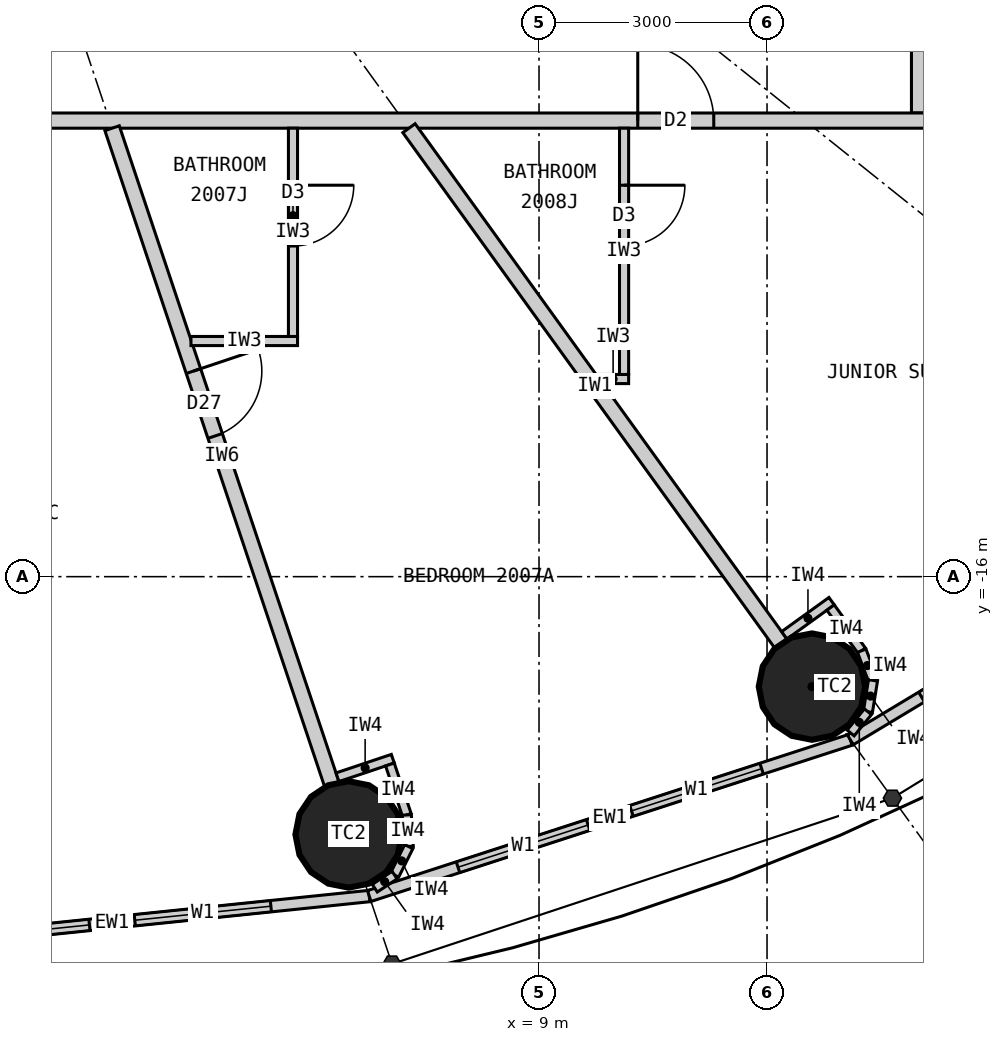
"""IFC4 building model, lengths in metres.
Left out: names, types, materials, properties, quantities, classifications, styles, units other than length and angle.
Written with IfcOpenShell. Run it as: python <this file> out.ifc"""

import sys

from ifc_helpers import new_model, si_unit, direction, frame, frame_2d, origin, origin_2d, place, context, subcontext, project, spatial, rectangle, circle, extrude, element, fill, save


model = new_model("IFC4")
c1 = context("Model", 3, precision=1e-05, world=origin(), true_north=direction((0.0, 1.0)))
c2 = subcontext(c1, "Body", "Model", "MODEL_VIEW")
j1 = project(units=[si_unit("LENGTHUNIT", "METRE"), si_unit("PLANEANGLEUNIT", "RADIAN")], contexts=[c1])
p1 = place(None, origin())
s1 = spatial("IfcSite", under=j1, at=p1, CompositionType="ELEMENT")
p2 = place(p1, origin())
s2 = spatial("IfcBuilding", under=s1, at=p2, CompositionType="ELEMENT")
p3 = place(p2, frame((0.0, 0.0, 80.4)))
s3 = spatial("IfcBuildingStorey", under=s2, at=p3, CompositionType="ELEMENT", Elevation=80.4)
for number, where, z_axis, x_axis in (
    (1, (6.495, -19.391, 0.0), (0.0, 0.0, 1.0), (1.0, 0.0, 0.0)),
    (2, (12.591, -17.447, 0.0), (0.0, 0.0, 1.0), (1.0, 0.0, 0.0)),
):
    element("IfcColumn", number, at=place(p3, frame(where, z_axis=z_axis, x_axis=x_axis)), inside=s3, PredefinedType="COLUMN", context=c2, shape_type="SweptSolid", body=[
        extrude(circle(Radius=0.7, at=origin_2d()), origin(), (0.0, 0.0, 1.0), 3.3),
    ])
p4 = place(p3, frame((0.0, -20.9, 0.0), z_axis=(0.0, 0.0, 1.0), x_axis=(0.994721394369, 0.102612609291, 0.0)))
e3 = element("IfcWall", 3, at=p4, inside=s3, PredefinedType="ELEMENTEDWALL", context=c2, shape_type="SweptSolid", body=[
    extrude(rectangle(XDim=6.802, YDim=0.15, at=frame_2d((3.401, 0.0))), origin(), (0.0, 0.0, 1.0), 3.12),
])
p5 = place(p4, frame((1.301, 0.0, 0.9)))
e4 = element("IfcOpeningElement", 4, at=p5, cuts=e3, PredefinedType="OPENING", context=c2, shape_type="SweptSolid", body=[
    extrude(rectangle(XDim=1.8, YDim=1.9, at=frame_2d((0.9, 0.95))), frame((0.0, 0.085, 0.0), z_axis=(0.0, -1.0, 0.0), x_axis=(1.0, 0.0, 0.0)), (0.0, 0.0, 1.0), 0.17),
])
p6 = place(p4, frame((3.701, 0.0, 0.9)))
e5 = element("IfcOpeningElement", 5, at=p6, cuts=e3, PredefinedType="OPENING", context=c2, shape_type="SweptSolid", body=[
    extrude(rectangle(XDim=1.8, YDim=1.9, at=frame_2d((0.9, 0.95))), frame((0.0, 0.085, 0.0), z_axis=(0.0, -1.0, 0.0), x_axis=(1.0, 0.0, 0.0)), (0.0, 0.0, 1.0), 0.17),
])
p7 = place(p3, frame((6.766, -20.202, 0.0), z_axis=(0.0, 0.0, 1.0), x_axis=(0.951137534625, 0.308767534285, 0.0)))
e6 = element("IfcWall", 6, at=p7, inside=s3, PredefinedType="ELEMENTEDWALL", context=c2, shape_type="SweptSolid", body=[
    extrude(rectangle(XDim=6.655, YDim=0.15, at=frame_2d((3.328, 0.0))), origin(), (0.0, 0.0, 1.0), 3.12),
])
p8 = place(p7, frame((1.228, 0.0, 0.9)))
e7 = element("IfcOpeningElement", 7, at=p8, cuts=e6, PredefinedType="OPENING", context=c2, shape_type="SweptSolid", body=[
    extrude(rectangle(XDim=1.8, YDim=1.9, at=frame_2d((0.9, 0.95))), frame((0.0, 0.085, 0.0), z_axis=(0.0, -1.0, 0.0), x_axis=(1.0, 0.0, 0.0)), (0.0, 0.0, 1.0), 0.17),
])
p9 = place(p7, frame((3.628, 0.0, 0.9)))
e8 = element("IfcOpeningElement", 8, at=p9, cuts=e6, PredefinedType="OPENING", context=c2, shape_type="SweptSolid", body=[
    extrude(rectangle(XDim=1.8, YDim=1.9, at=frame_2d((0.9, 0.95))), frame((0.0, 0.085, 0.0), z_axis=(0.0, -1.0, 0.0), x_axis=(1.0, 0.0, 0.0)), (0.0, 0.0, 1.0), 0.17),
])
p10 = place(p3, frame((13.096, -18.147, 0.0), z_axis=(0.0, 0.0, 1.0), x_axis=(0.856983180864, 0.515344377787, 0.0)))
e9 = element("IfcWall", 9, at=p10, inside=s3, PredefinedType="ELEMENTEDWALL", context=c2, shape_type="SweptSolid", body=[
    extrude(rectangle(XDim=6.386, YDim=0.15, at=frame_2d((3.193, 0.0))), origin(), (0.0, 0.0, 1.0), 3.12),
])
p11 = place(p10, frame((1.093, 0.0, 0.9)))
e10 = element("IfcOpeningElement", 10, at=p11, cuts=e9, PredefinedType="OPENING", context=c2, shape_type="SweptSolid", body=[
    extrude(rectangle(XDim=1.8, YDim=1.9, at=frame_2d((0.9, 0.95))), frame((0.0, 0.085, 0.0), z_axis=(0.0, -1.0, 0.0), x_axis=(1.0, 0.0, 0.0)), (0.0, 0.0, 1.0), 0.17),
])
p12 = place(p10, frame((3.493, 0.0, 0.9)))
e11 = element("IfcOpeningElement", 11, at=p12, cuts=e9, PredefinedType="OPENING", context=c2, shape_type="SweptSolid", body=[
    extrude(rectangle(XDim=1.8, YDim=1.9, at=frame_2d((0.9, 0.95))), frame((0.0, 0.085, 0.0), z_axis=(0.0, -1.0, 0.0), x_axis=(1.0, 0.0, 0.0)), (0.0, 0.0, 1.0), 0.17),
])
p13 = place(p3, frame((14.0, -9.9, 0.0), z_axis=(0.0, 0.0, 1.0), x_axis=(0.0, 1.0, 0.0)))
e12 = element("IfcWall", 12, at=p13, inside=s3, PredefinedType="PARTITIONING", context=c2, shape_type="SweptSolid", body=[
    extrude(rectangle(XDim=19.8, YDim=0.2, at=frame_2d((9.9, 0.0))), origin(), (0.0, 0.0, 1.0), 3.12),
])
p14 = place(p13, frame((5.948, 0.0, 0.0)))
e13 = element("IfcOpeningElement", 13, at=p14, cuts=e12, PredefinedType="OPENING", context=c2, shape_type="SweptSolid", body=[
    extrude(rectangle(XDim=1.0, YDim=2.2, at=frame_2d((0.5, 1.1))), frame((0.0, 0.11, 0.0), z_axis=(0.0, -1.0, 0.0), x_axis=(1.0, 0.0, 0.0)), (0.0, 0.0, 1.0), 0.22),
])
p15 = place(p13, frame((11.46, 0.0, 0.0)))
e14 = element("IfcOpeningElement", 14, at=p15, cuts=e12, PredefinedType="OPENING", context=c2, shape_type="SweptSolid", body=[
    extrude(rectangle(XDim=1.0, YDim=2.2, at=frame_2d((0.5, 1.1))), frame((0.0, 0.11, 0.0), z_axis=(0.0, -1.0, 0.0), x_axis=(1.0, 0.0, 0.0)), (0.0, 0.0, 1.0), 0.22),
])
p16 = place(p3, frame((14.1, -10.0, 0.0), z_axis=(0.0, 0.0, 1.0), x_axis=(-1.0, 0.0, 0.0)))
e15 = element("IfcWall", 15, at=p16, inside=s3, PredefinedType="PARTITIONING", context=c2, shape_type="SweptSolid", body=[
    extrude(rectangle(XDim=28.2, YDim=0.2, at=frame_2d((14.1, 0.0))), origin(), (0.0, 0.0, 1.0), 3.12),
])
p17 = place(p16, frame((23.865, 0.0, 0.0)))
e16 = element("IfcOpeningElement", 16, at=p17, cuts=e15, PredefinedType="OPENING", context=c2, shape_type="SweptSolid", body=[
    extrude(rectangle(XDim=1.0, YDim=2.2, at=frame_2d((0.5, 1.1))), frame((0.0, 0.11, 0.0), z_axis=(0.0, -1.0, 0.0), x_axis=(1.0, 0.0, 0.0)), (0.0, 0.0, 1.0), 0.22),
])
p18 = place(p16, frame((18.529, 0.0, 0.0)))
e17 = element("IfcOpeningElement", 17, at=p18, cuts=e15, PredefinedType="OPENING", context=c2, shape_type="SweptSolid", body=[
    extrude(rectangle(XDim=1.0, YDim=2.2, at=frame_2d((0.5, 1.1))), frame((0.0, 0.11, 0.0), z_axis=(0.0, -1.0, 0.0), x_axis=(1.0, 0.0, 0.0)), (0.0, 0.0, 1.0), 0.22),
])
p19 = place(p16, frame((14.923, 0.0, 0.0)))
e18 = element("IfcOpeningElement", 18, at=p19, cuts=e15, PredefinedType="OPENING", context=c2, shape_type="SweptSolid", body=[
    extrude(rectangle(XDim=1.0, YDim=2.2, at=frame_2d((0.5, 1.1))), frame((0.0, 0.11, 0.0), z_axis=(0.0, -1.0, 0.0), x_axis=(1.0, 0.0, 0.0)), (0.0, 0.0, 1.0), 0.22),
])
p20 = place(p16, frame((2.801, 0.0, 0.0)))
e19 = element("IfcOpeningElement", 19, at=p20, cuts=e15, PredefinedType="OPENING", context=c2, shape_type="SweptSolid", body=[
    extrude(rectangle(XDim=1.0, YDim=2.2, at=frame_2d((0.5, 1.1))), frame((0.0, 0.11, 0.0), z_axis=(0.0, -1.0, 0.0), x_axis=(1.0, 0.0, 0.0)), (0.0, 0.0, 1.0), 0.22),
])
p21 = place(p3, frame((3.383, -10.1, 0.0), z_axis=(0.0, 0.0, 1.0), x_axis=(0.31759592231, -0.948226149256, 0.0)))
e20 = element("IfcWall", 20, at=p21, inside=s3, PredefinedType="PARTITIONING", context=c2, shape_type="SweptSolid", body=[
    extrude(rectangle(XDim=9.098, YDim=0.2, at=frame_2d((4.549, 0.0))), origin(), (0.0, 0.0, 1.0), 2.32),
])
p22 = place(p21, frame((3.37, 0.0, 0.0)))
e21 = element("IfcOpeningElement", 21, at=p22, cuts=e20, PredefinedType="OPENING", context=c2, shape_type="SweptSolid", body=[
    extrude(rectangle(XDim=0.9, YDim=2.1, at=frame_2d((0.45, 1.05))), frame((0.0, 0.11, 0.0), z_axis=(0.0, -1.0, 0.0), x_axis=(1.0, 0.0, 0.0)), (0.0, 0.0, 1.0), 0.22),
])
p23 = place(p3, frame((7.289, -10.1, 0.0), z_axis=(0.0, 0.0, 1.0), x_axis=(0.585198353053, -0.810890182197, 0.0)))
e22 = element("IfcWall", 22, at=p23, inside=s3, PredefinedType="PARTITIONING", context=c2, shape_type="SweptSolid", body=[
    extrude(rectangle(XDim=8.36, YDim=0.2, at=frame_2d((4.18, 0.0))), origin(), (0.0, 0.0, 1.0), 2.32),
])
p24 = place(p3, frame((4.421, -12.9, 0.0), z_axis=(0.0, 0.0, 1.0), x_axis=(1.0, 0.0, 0.0)))
e23 = element("IfcWall", 23, at=p24, inside=s3, PredefinedType="PARTITIONING", context=c2, shape_type="SweptSolid", body=[
    extrude(rectangle(XDim=1.402, YDim=0.12, at=frame_2d((0.701, 0.0))), origin(), (0.0, 0.0, 1.0), 3.12),
])
p25 = place(p3, frame((5.763, -10.1, 0.0), z_axis=(0.0, 0.0, 1.0), x_axis=(0.0, -1.0, 0.0)))
e24 = element("IfcWall", 24, at=p25, inside=s3, PredefinedType="PARTITIONING", context=c2, shape_type="SweptSolid", body=[
    extrude(rectangle(XDim=2.74, YDim=0.12, at=frame_2d((1.37, 0.0))), origin(), (0.0, 0.0, 1.0), 3.12),
])
p26 = place(p25, frame((0.75, 0.0, 0.0)))
e25 = element("IfcOpeningElement", 25, at=p26, cuts=e24, PredefinedType="OPENING", context=c2, shape_type="SweptSolid", body=[
    extrude(rectangle(XDim=0.8, YDim=2.1, at=frame_2d((0.4, 1.05))), frame((0.0, 0.07, 0.0), z_axis=(0.0, -1.0, 0.0), x_axis=(1.0, 0.0, 0.0)), (0.0, 0.0, 1.0), 0.14),
])
p27 = place(p3, frame((9.771, -13.4, 0.0), z_axis=(0.0, 0.0, 1.0), x_axis=(1.0, 0.0, 0.0)))
e26 = element("IfcWall", 26, at=p27, inside=s3, PredefinedType="PARTITIONING", context=c2, shape_type="SweptSolid", body=[
    extrude(rectangle(XDim=0.408, YDim=0.12, at=frame_2d((0.204, 0.0))), origin(), (0.0, 0.0, 1.0), 3.12),
])
p28 = place(p3, frame((10.119, -10.1, 0.0), z_axis=(0.0, 0.0, 1.0), x_axis=(0.0, -1.0, 0.0)))
e27 = element("IfcWall", 27, at=p28, inside=s3, PredefinedType="PARTITIONING", context=c2, shape_type="SweptSolid", body=[
    extrude(rectangle(XDim=3.24, YDim=0.12, at=frame_2d((1.62, 0.0))), origin(), (0.0, 0.0, 1.0), 3.12),
])
p29 = place(p28, frame((0.75, 0.0, 0.0)))
e28 = element("IfcOpeningElement", 28, at=p29, cuts=e27, PredefinedType="OPENING", context=c2, shape_type="SweptSolid", body=[
    extrude(rectangle(XDim=0.8, YDim=2.1, at=frame_2d((0.4, 1.05))), frame((0.0, 0.07, 0.0), z_axis=(0.0, -1.0, 0.0), x_axis=(1.0, 0.0, 0.0)), (0.0, 0.0, 1.0), 0.14),
])
p30 = place(p3, frame((6.348, -18.639, 0.0), z_axis=(0.0, 0.0, 1.0), x_axis=(0.948268951266, 0.317468102437, 0.0)))
e29 = element("IfcWall", 29, at=p30, inside=s3, PredefinedType="PARTITIONING", context=c2, shape_type="SweptSolid", body=[
    extrude(rectangle(XDim=0.768, YDim=0.12, at=frame_2d((0.384, 0.0))), origin(), (0.0, 0.0, 1.0), 3.12),
])
p31 = place(p3, frame((7.038, -18.471, 0.0), z_axis=(0.0, 0.0, 1.0), x_axis=(0.317378466199, -0.9482989556, 0.0)))
e30 = element("IfcWall", 30, at=p31, inside=s3, PredefinedType="PARTITIONING", context=c2, shape_type="SweptSolid", body=[
    extrude(rectangle(XDim=0.7, YDim=0.12, at=frame_2d((0.35, 0.0))), origin(), (0.0, 0.0, 1.0), 3.12),
])
p32 = place(p3, frame((7.26, -19.135, 0.0), z_axis=(0.0, 0.0, 1.0), x_axis=(0.0613238046, -0.99811792439, 0.0)))
e31 = element("IfcWall", 31, at=p32, inside=s3, PredefinedType="PARTITIONING", context=c2, shape_type="SweptSolid", body=[
    extrude(rectangle(XDim=0.418, YDim=0.12, at=frame_2d((0.209, 0.0))), origin(), (0.0, 0.0, 1.0), 3.12),
])
p33 = place(p3, frame((7.286, -19.552, 0.0), z_axis=(0.0, 0.0, 1.0), x_axis=(-0.445810757773, -0.89512723579, 0.0)))
e32 = element("IfcWall", 32, at=p33, inside=s3, PredefinedType="PARTITIONING", context=c2, shape_type="SweptSolid", body=[
    extrude(rectangle(XDim=0.418, YDim=0.12, at=frame_2d((0.209, 0.0))), origin(), (0.0, 0.0, 1.0), 3.12),
])
p34 = place(p3, frame((7.1, -19.926, 0.0), z_axis=(0.0, 0.0, 1.0), x_axis=(-0.833488262509, -0.552537162787, 0.0)))
e33 = element("IfcWall", 33, at=p34, inside=s3, PredefinedType="PARTITIONING", context=c2, shape_type="SweptSolid", body=[
    extrude(rectangle(XDim=0.313, YDim=0.12, at=frame_2d((0.156, 0.0))), origin(), (0.0, 0.0, 1.0), 3.12),
])
p35 = place(p3, frame((12.227, -16.772, 0.0), z_axis=(0.0, 0.0, 1.0), x_axis=(0.810821798253, 0.585293098778, 0.0)))
e34 = element("IfcWall", 34, at=p35, inside=s3, PredefinedType="PARTITIONING", context=c2, shape_type="SweptSolid", body=[
    extrude(rectangle(XDim=0.768, YDim=0.12, at=frame_2d((0.384, 0.0))), origin(), (0.0, 0.0, 1.0), 3.12),
])
p36 = place(p3, frame((12.836, -16.406, 0.0), z_axis=(0.0, 0.0, 1.0), x_axis=(0.585223113993, -0.810872312296, 0.0)))
e35 = element("IfcWall", 35, at=p36, inside=s3, PredefinedType="PARTITIONING", context=c2, shape_type="SweptSolid", body=[
    extrude(rectangle(XDim=0.7, YDim=0.12, at=frame_2d((0.35, 0.0))), origin(), (0.0, 0.0, 1.0), 3.12),
])
p37 = place(p3, frame((13.246, -16.974, 0.0), z_axis=(0.0, 0.0, 1.0), x_axis=(0.355728122235, -0.934589483705, 0.0)))
e36 = element("IfcWall", 36, at=p37, inside=s3, PredefinedType="PARTITIONING", context=c2, shape_type="SweptSolid", body=[
    extrude(rectangle(XDim=0.418, YDim=0.12, at=frame_2d((0.209, 0.0))), origin(), (0.0, 0.0, 1.0), 3.12),
])
p38 = place(p3, frame((13.394, -17.365, 0.0), z_axis=(0.0, 0.0, 1.0), x_axis=(-0.159379276926, -0.987217425943, 0.0)))
e37 = element("IfcWall", 37, at=p38, inside=s3, PredefinedType="PARTITIONING", context=c2, shape_type="SweptSolid", body=[
    extrude(rectangle(XDim=0.418, YDim=0.12, at=frame_2d((0.209, 0.0))), origin(), (0.0, 0.0, 1.0), 3.12),
])
p39 = place(p3, frame((13.328, -17.777, 0.0), z_axis=(0.0, 0.0, 1.0), x_axis=(-0.632276783541, -0.774742582407, 0.0)))
e38 = element("IfcWall", 38, at=p39, inside=s3, PredefinedType="PARTITIONING", context=c2, shape_type="SweptSolid", body=[
    extrude(rectangle(XDim=0.36, YDim=0.12, at=frame_2d((0.18, 0.0))), origin(), (0.0, 0.0, 1.0), 3.12),
])
p40 = place(p5, origin())
e39 = element("IfcWindow", 39, at=p40, inside=s3, PartitioningType="SINGLE_PANEL", PredefinedType="WINDOW", context=c2, shape_type="SweptSolid", body=[
    extrude(rectangle(XDim=1.8, YDim=1.9, at=frame_2d((0.9, 0.95))), frame((0.0, 0.03, 0.0), z_axis=(0.0, -1.0, 0.0), x_axis=(1.0, 0.0, 0.0)), (0.0, 0.0, 1.0), 0.06),
])
fill(e4, e39)
p41 = place(p6, origin())
e40 = element("IfcWindow", 40, at=p41, inside=s3, PartitioningType="SINGLE_PANEL", PredefinedType="WINDOW", context=c2, shape_type="SweptSolid", body=[
    extrude(rectangle(XDim=1.8, YDim=1.9, at=frame_2d((0.9, 0.95))), frame((0.0, 0.03, 0.0), z_axis=(0.0, -1.0, 0.0), x_axis=(1.0, 0.0, 0.0)), (0.0, 0.0, 1.0), 0.06),
])
fill(e5, e40)
p42 = place(p8, origin())
e41 = element("IfcWindow", 41, at=p42, inside=s3, PartitioningType="SINGLE_PANEL", PredefinedType="WINDOW", context=c2, shape_type="SweptSolid", body=[
    extrude(rectangle(XDim=1.8, YDim=1.9, at=frame_2d((0.9, 0.95))), frame((0.0, 0.03, 0.0), z_axis=(0.0, -1.0, 0.0), x_axis=(1.0, 0.0, 0.0)), (0.0, 0.0, 1.0), 0.06),
])
fill(e7, e41)
p43 = place(p9, origin())
e42 = element("IfcWindow", 42, at=p43, inside=s3, PartitioningType="SINGLE_PANEL", PredefinedType="WINDOW", context=c2, shape_type="SweptSolid", body=[
    extrude(rectangle(XDim=1.8, YDim=1.9, at=frame_2d((0.9, 0.95))), frame((0.0, 0.03, 0.0), z_axis=(0.0, -1.0, 0.0), x_axis=(1.0, 0.0, 0.0)), (0.0, 0.0, 1.0), 0.06),
])
fill(e8, e42)
p44 = place(p11, origin())
e43 = element("IfcWindow", 43, at=p44, inside=s3, PartitioningType="SINGLE_PANEL", PredefinedType="WINDOW", context=c2, shape_type="SweptSolid", body=[
    extrude(rectangle(XDim=1.8, YDim=1.9, at=frame_2d((0.9, 0.95))), frame((0.0, 0.03, 0.0), z_axis=(0.0, -1.0, 0.0), x_axis=(1.0, 0.0, 0.0)), (0.0, 0.0, 1.0), 0.06),
])
fill(e10, e43)
p45 = place(p26, origin())
e44 = element("IfcDoor", 44, at=p45, inside=s3, OperationType="SINGLE_SWING_LEFT", PredefinedType="DOOR", context=c2, shape_type="SweptSolid", body=[
    extrude(rectangle(XDim=0.8, YDim=2.1, at=frame_2d((0.4, 1.05))), frame((0.0, 0.025, 0.0), z_axis=(0.0, -1.0, 0.0), x_axis=(1.0, 0.0, 0.0)), (0.0, 0.0, 1.0), 0.05),
])
fill(e25, e44)
p46 = place(p22, origin())
e45 = element("IfcDoor", 45, at=p46, inside=s3, OperationType="SINGLE_SWING_LEFT", PredefinedType="DOOR", context=c2, shape_type="SweptSolid", body=[
    extrude(rectangle(XDim=0.9, YDim=2.1, at=frame_2d((0.45, 1.05))), frame((0.0, 0.025, 0.0), z_axis=(0.0, -1.0, 0.0), x_axis=(1.0, 0.0, 0.0)), (0.0, 0.0, 1.0), 0.05),
])
fill(e21, e45)
p47 = place(p29, origin())
e46 = element("IfcDoor", 46, at=p47, inside=s3, OperationType="SINGLE_SWING_LEFT", PredefinedType="DOOR", context=c2, shape_type="SweptSolid", body=[
    extrude(rectangle(XDim=0.8, YDim=2.1, at=frame_2d((0.4, 1.05))), frame((0.0, 0.025, 0.0), z_axis=(0.0, -1.0, 0.0), x_axis=(1.0, 0.0, 0.0)), (0.0, 0.0, 1.0), 0.05),
])
fill(e28, e46)
p48 = place(p20, origin())
e47 = element("IfcDoor", 47, at=p48, inside=s3, OperationType="SINGLE_SWING_RIGHT", PredefinedType="DOOR", context=c2, shape_type="SweptSolid", body=[
    extrude(rectangle(XDim=1.0, YDim=2.2, at=frame_2d((0.5, 1.1))), frame((0.0, 0.025, 0.0), z_axis=(0.0, -1.0, 0.0), x_axis=(1.0, 0.0, 0.0)), (0.0, 0.0, 1.0), 0.05),
])
fill(e19, e47)
save(model, sys.argv[1])
